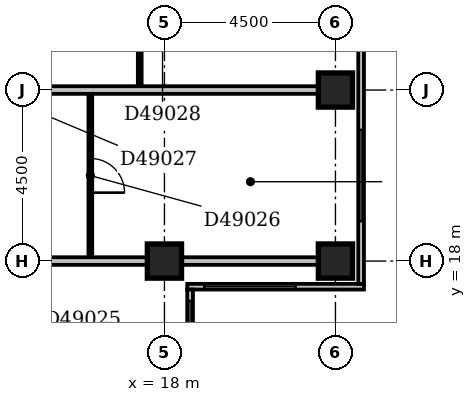
"""IFC4 building model, lengths in metres.
Left out: names, types, materials, properties, quantities, classifications, styles, units other than length and angle.
Written with IfcOpenShell. Run it as: python <this file> out.ifc"""

import sys

from ifc_helpers import new_model, si_unit, direction, frame, frame_2d, origin, origin_2d, place, context, subcontext, project, spatial, rectangle, extrude, element, fill, save


model = new_model("IFC4")
c1 = context("Model", 3, precision=1e-05, world=origin(), true_north=direction((0.0, 1.0)))
c2 = subcontext(c1, "Body", "Model", "MODEL_VIEW")
j1 = project(units=[si_unit("LENGTHUNIT", "METRE"), si_unit("PLANEANGLEUNIT", "RADIAN")], contexts=[c1])
p1 = place(None, origin())
s1 = spatial("IfcSite", under=j1, at=p1, CompositionType="ELEMENT")
p2 = place(p1, origin())
s2 = spatial("IfcBuilding", under=s1, at=p2, CompositionType="ELEMENT")
p3 = place(p2, frame((0.0, 0.0, 193.4)))
s3 = spatial("IfcBuildingStorey", under=s2, at=p3, CompositionType="ELEMENT", Elevation=193.4)
for number, where, z_axis, x_axis in (
    (1, (18.0, 18.0, -0.3), (0.0, 0.0, 1.0), (1.0, 0.0, 0.0)),
    (2, (22.5, 18.0, -0.3), (0.0, 0.0, 1.0), (1.0, 0.0, 0.0)),
    (3, (22.5, 22.5, -0.3), (0.0, 0.0, 1.0), (1.0, 0.0, 0.0)),
):
    element("IfcColumn", number, at=place(p3, frame(where, z_axis=z_axis, x_axis=x_axis)), inside=s3, PredefinedType="COLUMN", context=c2, shape_type="SweptSolid", body=[
        extrude(rectangle(XDim=0.9, YDim=0.9, at=origin_2d()), origin(), (0.0, 0.0, 1.0), 3.6),
    ])
p4 = place(p3, frame((18.675, 8.4, 0.0), z_axis=(0.0, 0.0, 1.0), x_axis=(0.0, 1.0, 0.0)))
e4 = element("IfcWall", 4, at=p4, inside=s3, PredefinedType="STANDARD", context=c2, shape_type="SweptSolid", body=[
    extrude(rectangle(XDim=8.85, YDim=0.15, at=frame_2d((4.425, 0.0))), origin(), (0.0, 0.0, 1.0), 2.7),
])
p5 = place(p4, frame((1.384, 0.0, 0.6)))
e5 = element("IfcOpeningElement", 5, at=p5, cuts=e4, PredefinedType="OPENING", context=c2, shape_type="SweptSolid", body=[
    extrude(rectangle(XDim=1.5, YDim=1.8, at=frame_2d((0.75, 0.9))), frame((0.0, 0.087, 0.0), z_axis=(0.0, -1.0, 0.0), x_axis=(1.0, 0.0, 0.0)), (0.0, 0.0, 1.0), 0.174),
])
p6 = place(p4, frame((6.15, 0.0, 0.6)))
e6 = element("IfcOpeningElement", 6, at=p6, cuts=e4, PredefinedType="OPENING", context=c2, shape_type="SweptSolid", body=[
    extrude(rectangle(XDim=2.4, YDim=1.8, at=frame_2d((1.2, 0.9))), frame((0.0, 0.087, 0.0), z_axis=(0.0, -1.0, 0.0), x_axis=(1.0, 0.0, 0.0)), (0.0, 0.0, 1.0), 0.174),
])
p7 = place(p3, frame((18.6, 17.325, 0.0), z_axis=(0.0, 0.0, 1.0), x_axis=(1.0, 0.0, 0.0)))
e7 = element("IfcWall", 7, at=p7, inside=s3, PredefinedType="STANDARD", context=c2, shape_type="SweptSolid", body=[
    extrude(rectangle(XDim=4.65, YDim=0.15, at=frame_2d((2.325, 0.0))), origin(), (0.0, 0.0, 1.0), 2.7),
])
p8 = place(p7, frame((0.45, 0.0, 0.6)))
e8 = element("IfcOpeningElement", 8, at=p8, cuts=e7, PredefinedType="OPENING", context=c2, shape_type="SweptSolid", body=[
    extrude(rectangle(XDim=2.4, YDim=1.8, at=frame_2d((1.2, 0.9))), frame((0.0, 0.087, 0.0), z_axis=(0.0, -1.0, 0.0), x_axis=(1.0, 0.0, 0.0)), (0.0, 0.0, 1.0), 0.174),
])
p9 = place(p3, frame((23.175, 17.4, 0.0), z_axis=(0.0, 0.0, 1.0), x_axis=(0.0, 1.0, 0.0)))
e9 = element("IfcWall", 9, at=p9, inside=s3, PredefinedType="STANDARD", context=c2, shape_type="SweptSolid", body=[
    extrude(rectangle(XDim=17.85, YDim=0.15, at=frame_2d((8.925, 0.0))), origin(), (0.0, 0.0, 1.0), 2.7),
])
p10 = place(p9, frame((1.65, 0.0, 0.6)))
e10 = element("IfcOpeningElement", 10, at=p10, cuts=e9, PredefinedType="OPENING", context=c2, shape_type="SweptSolid", body=[
    extrude(rectangle(XDim=2.4, YDim=1.8, at=frame_2d((1.2, 0.9))), frame((0.0, 0.087, 0.0), z_axis=(0.0, -1.0, 0.0), x_axis=(1.0, 0.0, 0.0)), (0.0, 0.0, 1.0), 0.174),
])
p11 = place(p9, frame((7.922, 0.0, 0.6)))
e11 = element("IfcOpeningElement", 11, at=p11, cuts=e9, PredefinedType="OPENING", context=c2, shape_type="SweptSolid", body=[
    extrude(rectangle(XDim=0.9, YDim=1.8, at=frame_2d((0.45, 0.9))), frame((0.0, 0.087, 0.0), z_axis=(0.0, -1.0, 0.0), x_axis=(1.0, 0.0, 0.0)), (0.0, 0.0, 1.0), 0.174),
])
p12 = place(p9, frame((10.65, 0.0, 0.6)))
e12 = element("IfcOpeningElement", 12, at=p12, cuts=e9, PredefinedType="OPENING", context=c2, shape_type="SweptSolid", body=[
    extrude(rectangle(XDim=2.4, YDim=1.8, at=frame_2d((1.2, 0.9))), frame((0.0, 0.087, 0.0), z_axis=(0.0, -1.0, 0.0), x_axis=(1.0, 0.0, 0.0)), (0.0, 0.0, 1.0), 0.174),
])
p13 = place(p9, frame((15.15, 0.0, 0.6)))
e13 = element("IfcOpeningElement", 13, at=p13, cuts=e9, PredefinedType="OPENING", context=c2, shape_type="SweptSolid", body=[
    extrude(rectangle(XDim=2.4, YDim=1.8, at=frame_2d((1.2, 0.9))), frame((0.0, 0.087, 0.0), z_axis=(0.0, -1.0, 0.0), x_axis=(1.0, 0.0, 0.0)), (0.0, 0.0, 1.0), 0.174),
])
p14 = place(p3, frame((9.1, 18.0, 0.0), z_axis=(0.0, 0.0, 1.0), x_axis=(1.0, 0.0, 0.0)))
e14 = element("IfcWall", 14, at=p14, inside=s3, PredefinedType="PARTITIONING", context=c2, shape_type="SweptSolid", body=[
    extrude(rectangle(XDim=8.45, YDim=0.2, at=frame_2d((4.225, 0.0))), origin(), (0.0, 0.0, 1.0), 2.6),
])
p15 = place(p3, frame((18.45, 18.0, 0.0), z_axis=(0.0, 0.0, 1.0), x_axis=(1.0, 0.0, 0.0)))
e15 = element("IfcWall", 15, at=p15, inside=s3, PredefinedType="PARTITIONING", context=c2, shape_type="SweptSolid", body=[
    extrude(rectangle(XDim=3.6, YDim=0.2, at=frame_2d((1.8, 0.0))), origin(), (0.0, 0.0, 1.0), 2.7),
])
p16 = place(p3, frame((16.05, 18.1, 0.0), z_axis=(0.0, 0.0, 1.0), x_axis=(0.0, 1.0, 0.0)))
e16 = element("IfcWall", 16, at=p16, inside=s3, PredefinedType="PARTITIONING", context=c2, shape_type="SweptSolid", body=[
    extrude(rectangle(XDim=4.3, YDim=0.1, at=frame_2d((2.15, 0.0))), origin(), (0.0, 0.0, 1.0), 3.3),
])
p17 = place(p16, frame((1.7, 0.0, 0.0)))
e17 = element("IfcOpeningElement", 17, at=p17, cuts=e16, PredefinedType="OPENING", context=c2, shape_type="SweptSolid", body=[
    extrude(rectangle(XDim=0.9, YDim=2.1, at=frame_2d((0.45, 1.05))), frame((0.0, 0.062, 0.0), z_axis=(0.0, -1.0, 0.0), x_axis=(1.0, 0.0, 0.0)), (0.0, 0.0, 1.0), 0.124),
])
p18 = place(p3, frame((9.1, 22.5, 0.0), z_axis=(0.0, 0.0, 1.0), x_axis=(1.0, 0.0, 0.0)))
e18 = element("IfcWall", 18, at=p18, inside=s3, PredefinedType="PARTITIONING", context=c2, shape_type="SweptSolid", body=[
    extrude(rectangle(XDim=12.95, YDim=0.2, at=frame_2d((6.475, 0.0))), origin(), (0.0, 0.0, 1.0), 3.3),
])
p19 = place(p3, frame((17.35, 22.6, 0.0), z_axis=(0.0, 0.0, 1.0), x_axis=(0.0, 1.0, 0.0)))
e19 = element("IfcWall", 19, at=p19, inside=s3, PredefinedType="PARTITIONING", context=c2, shape_type="SweptSolid", body=[
    extrude(rectangle(XDim=13.3, YDim=0.1, at=frame_2d((6.65, 0.0))), origin(), (0.0, 0.0, 1.0), 3.3),
])
p20 = place(p19, frame((1.7, 0.0, 0.0)))
e20 = element("IfcOpeningElement", 20, at=p20, cuts=e19, PredefinedType="OPENING", context=c2, shape_type="SweptSolid", body=[
    extrude(rectangle(XDim=0.9, YDim=2.1, at=frame_2d((0.45, 1.05))), frame((0.0, 0.062, 0.0), z_axis=(0.0, -1.0, 0.0), x_axis=(1.0, 0.0, 0.0)), (0.0, 0.0, 1.0), 0.124),
])
p21 = place(p19, frame((7.35, 0.0, 0.0)))
e21 = element("IfcOpeningElement", 21, at=p21, cuts=e19, PredefinedType="OPENING", context=c2, shape_type="SweptSolid", body=[
    extrude(rectangle(XDim=0.9, YDim=2.1, at=frame_2d((0.45, 1.05))), frame((0.0, 0.062, 0.0), z_axis=(0.0, -1.0, 0.0), x_axis=(1.0, 0.0, 0.0)), (0.0, 0.0, 1.0), 0.124),
])
p22 = place(p19, frame((10.7, 0.0, 0.0)))
e22 = element("IfcOpeningElement", 22, at=p22, cuts=e19, PredefinedType="OPENING", context=c2, shape_type="SweptSolid", body=[
    extrude(rectangle(XDim=0.9, YDim=2.1, at=frame_2d((0.45, 1.05))), frame((0.0, 0.062, 0.0), z_axis=(0.0, -1.0, 0.0), x_axis=(1.0, 0.0, 0.0)), (0.0, 0.0, 1.0), 0.124),
])
p23 = place(p6, origin())
e23 = element("IfcWindow", 23, at=p23, inside=s3, PartitioningType="SINGLE_PANEL", PredefinedType="WINDOW", context=c2, shape_type="SweptSolid", body=[
    extrude(rectangle(XDim=2.4, YDim=1.8, at=frame_2d((1.2, 0.9))), frame((0.0, 0.03, 0.0), z_axis=(0.0, -1.0, 0.0), x_axis=(1.0, 0.0, 0.0)), (0.0, 0.0, 1.0), 0.06),
])
fill(e6, e23)
p24 = place(p8, origin())
e24 = element("IfcWindow", 24, at=p24, inside=s3, PartitioningType="SINGLE_PANEL", PredefinedType="WINDOW", context=c2, shape_type="SweptSolid", body=[
    extrude(rectangle(XDim=2.4, YDim=1.8, at=frame_2d((1.2, 0.9))), frame((0.0, 0.03, 0.0), z_axis=(0.0, -1.0, 0.0), x_axis=(1.0, 0.0, 0.0)), (0.0, 0.0, 1.0), 0.06),
])
fill(e8, e24)
p25 = place(p10, origin())
e25 = element("IfcWindow", 25, at=p25, inside=s3, PartitioningType="SINGLE_PANEL", PredefinedType="WINDOW", context=c2, shape_type="SweptSolid", body=[
    extrude(rectangle(XDim=2.4, YDim=1.8, at=frame_2d((1.2, 0.9))), frame((0.0, 0.03, 0.0), z_axis=(0.0, -1.0, 0.0), x_axis=(1.0, 0.0, 0.0)), (0.0, 0.0, 1.0), 0.06),
])
fill(e10, e25)
p26 = place(p17, frame((0.9, 0.0, 0.0), z_axis=(0.0, 0.0, 1.0), x_axis=(-1.0, 0.0, 0.0)))
e26 = element("IfcDoor", 26, at=p26, inside=s3, OperationType="SINGLE_SWING_RIGHT", PredefinedType="DOOR", context=c2, shape_type="SweptSolid", body=[
    extrude(rectangle(XDim=0.9, YDim=2.1, at=frame_2d((0.45, 1.05))), frame((0.0, 0.025, 0.0), z_axis=(0.0, -1.0, 0.0), x_axis=(1.0, 0.0, 0.0)), (0.0, 0.0, 1.0), 0.05),
])
fill(e17, e26)
save(model, sys.argv[1])
